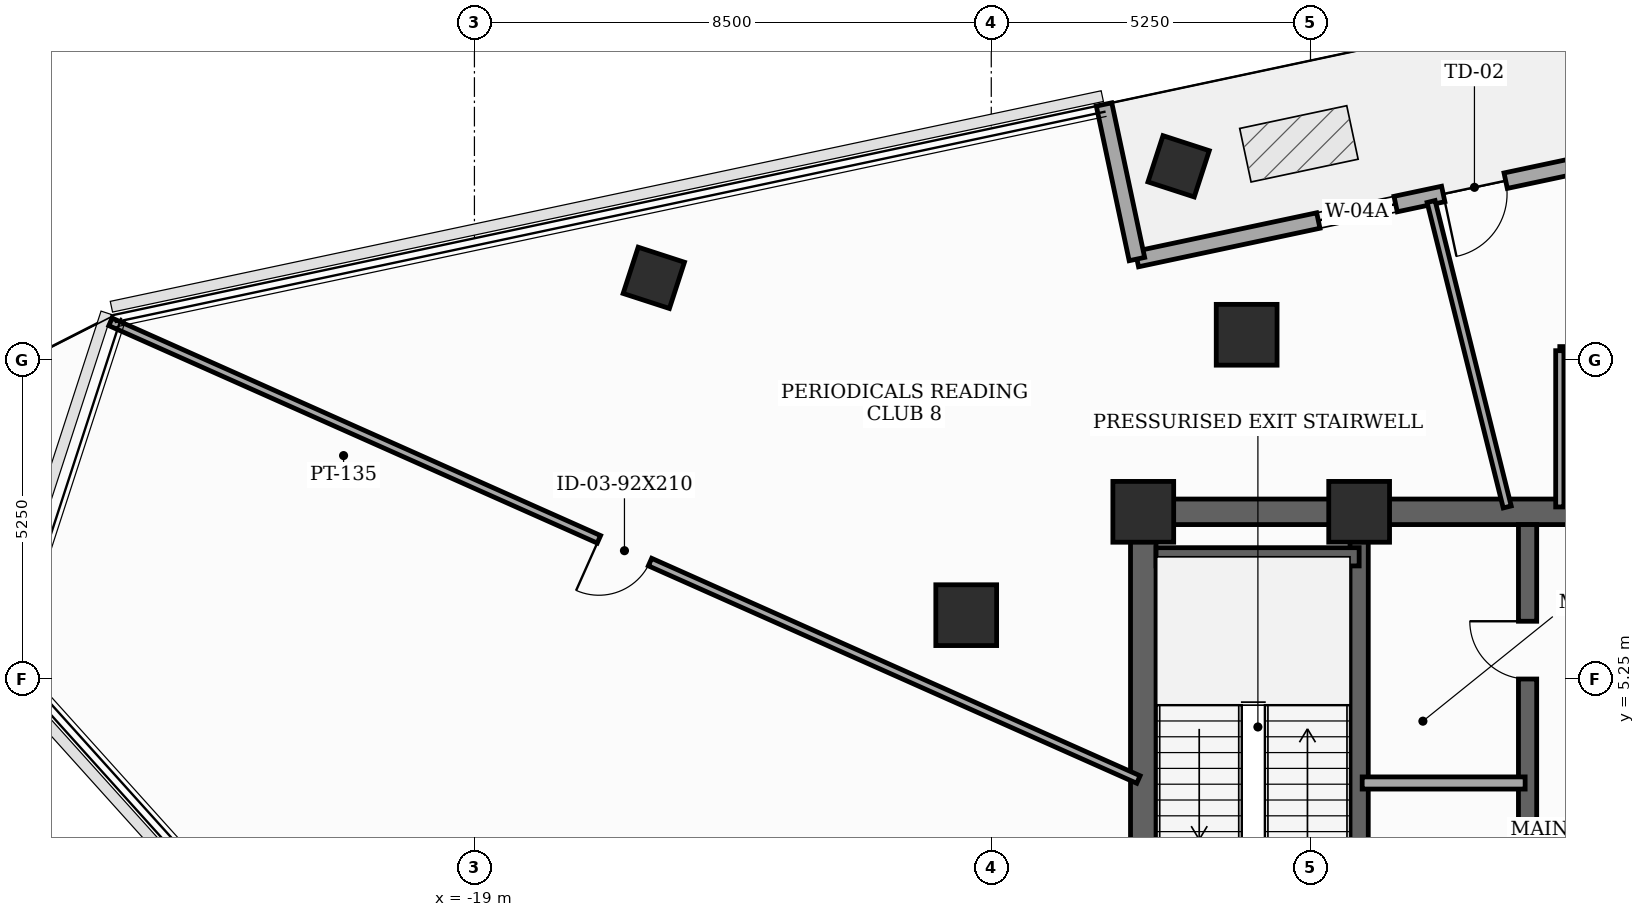
"""IFC4 building model, lengths in metres.
Left out: names, types, materials, properties, quantities, classifications, styles, units other than length and angle.
Written with IfcOpenShell. Run it as: python <this file> out.ifc"""

import sys

from ifc_helpers import new_model, si_unit, direction, frame, frame_2d, origin, origin_2d, place, context, subcontext, project, spatial, rectangle, extrude, element, fill, save


model = new_model("IFC4")
c1 = context("Model", 3, precision=1e-05, world=origin(), true_north=direction((0.0, 1.0)))
c2 = subcontext(c1, "Body", "Model", "MODEL_VIEW")
j1 = project(units=[si_unit("LENGTHUNIT", "METRE"), si_unit("PLANEANGLEUNIT", "RADIAN")], contexts=[c1])
p1 = place(None, origin())
s1 = spatial("IfcSite", under=j1, at=p1, CompositionType="ELEMENT")
p2 = place(p1, origin())
s2 = spatial("IfcBuilding", under=s1, at=p2, CompositionType="ELEMENT")
p3 = place(p2, frame((0.0, 0.0, 290.6)))
s3 = spatial("IfcBuildingStorey", under=s2, at=p3, CompositionType="ELEMENT", Elevation=290.6)
for number, where, z_axis, x_axis in (
    (1, (-4.45, 8.0, 0.0), (0.0, 0.0, 1.0), (1.0, 0.0, 0.0)),
    (2, (-8.0, 8.0, 0.0), (0.0, 0.0, 1.0), (1.0, 0.0, 0.0)),
    (3, (-6.3, 10.912, 0.0), (0.0, 0.0, 1.0), (1.0, 0.0, 0.0)),
    (4, (-10.912, 6.3, 0.0), (0.0, 0.0, 1.0), (1.0, 0.0, 0.0)),
):
    element("IfcColumn", number, at=place(p3, frame(where, z_axis=z_axis, x_axis=x_axis)), inside=s3, PredefinedType="COLUMN", context=c2, shape_type="SweptSolid", body=[
        extrude(rectangle(XDim=1.0, YDim=1.0, at=origin_2d()), origin(), (0.0, 0.0, 1.0), 3.7),
    ])
for number, where, z_axis, x_axis in (
    (5, (-7.419, 13.683, 0.0), (0.0, 0.0, 1.0), (0.309, 0.951, 0.0)),
    (6, (-16.05, 11.848, 0.0), (0.0, 0.0, 1.0), (0.309, 0.951, 0.0)),
):
    element("IfcColumn", number, at=place(p3, frame(where, z_axis=z_axis, x_axis=x_axis)), inside=s3, PredefinedType="COLUMN", context=c2, shape_type="SweptSolid", body=[
        extrude(rectangle(XDim=0.8, YDim=0.8, at=origin_2d()), origin(), (0.0, 0.0, 1.0), 3.7),
    ])
p4 = place(p3, frame((2.459, 14.402, 0.0), z_axis=(0.0, 0.0, 1.0), x_axis=(-0.978149082982, -0.207904717268, 0.0)))
e7 = element("IfcWall", 7, at=p4, inside=s3, PredefinedType="SOLIDWALL", context=c2, shape_type="SweptSolid", body=[
    extrude(rectangle(XDim=10.8, YDim=0.26, at=frame_2d((5.4, 0.0))), origin(), (0.0, 0.0, 1.0), 3.5),
])
p5 = place(p4, frame((4.6, 0.0, 0.0)))
e8 = element("IfcOpeningElement", 8, at=p5, cuts=e7, PredefinedType="OPENING", context=c2, shape_type="SweptSolid", body=[
    extrude(rectangle(XDim=1.05, YDim=2.08, at=frame_2d((0.525, 1.04))), frame((0.0, 0.14, 0.0), z_axis=(0.0, -1.0, 0.0), x_axis=(1.0, 0.0, 0.0)), (0.0, 0.0, 1.0), 0.28),
])
p6 = place(p4, frame((6.45, 0.0, 0.85)))
e9 = element("IfcOpeningElement", 9, at=p6, cuts=e7, PredefinedType="OPENING", context=c2, shape_type="SweptSolid", body=[
    extrude(rectangle(XDim=1.3, YDim=1.25, at=frame_2d((0.65, 0.625))), frame((0.0, 0.14, 0.0), z_axis=(0.0, -1.0, 0.0), x_axis=(1.0, 0.0, 0.0)), (0.0, 0.0, 1.0), 0.28),
])
p7 = place(p3, frame((-8.105, 12.157, 0.0), z_axis=(0.0, 0.0, 1.0), x_axis=(-0.207893569688, 0.978151452323, 0.0)))
e10 = element("IfcWall", 10, at=p7, inside=s3, PredefinedType="SOLIDWALL", context=c2, shape_type="SweptSolid", body=[
    extrude(rectangle(XDim=2.6, YDim=0.26, at=frame_2d((1.3, 0.0))), origin(), (0.0, 0.0, 1.0), 3.5),
])
p8 = place(p3, frame((-8.0, -8.0, 0.0), z_axis=(0.0, 0.0, 1.0), x_axis=(0.0, 1.0, 0.0)))
e11 = element("IfcWall", 11, at=p8, inside=s3, PredefinedType="SHEAR", context=c2, shape_type="SweptSolid", body=[
    extrude(rectangle(XDim=16.0, YDim=0.42, at=frame_2d((8.0, 0.0))), origin(), (0.0, 0.0, 1.0), 3.5),
])
p9 = place(p8, frame((0.681, 0.0, 0.0)))
e12 = element("IfcOpeningElement", 12, at=p9, cuts=e11, PredefinedType="OPENING", context=c2, shape_type="SweptSolid", body=[
    extrude(rectangle(XDim=0.85, YDim=2.02, at=frame_2d((0.425, 1.01))), frame((0.0, 0.22, 0.0), z_axis=(0.0, -1.0, 0.0), x_axis=(1.0, 0.0, 0.0)), (0.0, 0.0, 1.0), 0.44),
])
p10 = place(p8, frame((5.35, 0.0, 0.0)))
e13 = element("IfcOpeningElement", 13, at=p10, cuts=e11, PredefinedType="OPENING", context=c2, shape_type="SweptSolid", body=[
    extrude(rectangle(XDim=1.05, YDim=2.15, at=frame_2d((0.525, 1.075))), frame((0.0, 0.22, 0.0), z_axis=(0.0, -1.0, 0.0), x_axis=(1.0, 0.0, 0.0)), (0.0, 0.0, 1.0), 0.44),
])
p11 = place(p3, frame((-8.0, 8.0, 0.0), z_axis=(0.0, 0.0, 1.0), x_axis=(1.0, 0.0, 0.0)))
e14 = element("IfcWall", 14, at=p11, inside=s3, PredefinedType="SHEAR", context=c2, shape_type="SweptSolid", body=[
    extrude(rectangle(XDim=16.0, YDim=0.42, at=frame_2d((8.0, 0.0))), origin(), (0.0, 0.0, 1.0), 3.5),
])
p12 = place(p11, frame((7.1, 0.0, 0.0)))
e15 = element("IfcOpeningElement", 15, at=p12, cuts=e14, PredefinedType="OPENING", context=c2, shape_type="SweptSolid", body=[
    extrude(rectangle(XDim=1.8, YDim=2.15, at=frame_2d((0.9, 1.075))), frame((0.0, 0.22, 0.0), z_axis=(0.0, -1.0, 0.0), x_axis=(1.0, 0.0, 0.0)), (0.0, 0.0, 1.0), 0.44),
])
p13 = place(p3, frame((-4.45, -7.79, 0.0), z_axis=(0.0, 0.0, 1.0), x_axis=(0.0, 1.0, 0.0)))
e16 = element("IfcWall", 16, at=p13, inside=s3, PredefinedType="SHEAR", context=c2, shape_type="SweptSolid", body=[
    extrude(rectangle(XDim=15.58, YDim=0.3, at=frame_2d((7.79, 0.0))), origin(), (0.0, 0.0, 1.0), 3.5),
])
p14 = place(p3, frame((-7.79, 7.26, 0.0), z_axis=(0.0, 0.0, 1.0), x_axis=(1.0, 0.0, 0.0)))
e17 = element("IfcWall", 17, at=p14, inside=s3, PredefinedType="SHEAR", context=c2, shape_type="SweptSolid", body=[
    extrude(rectangle(XDim=3.34, YDim=0.3, at=frame_2d((1.67, 0.0))), origin(), (0.0, 0.0, 1.0), 3.5),
])
p15 = place(p3, frame((-1.68, -4.85, 0.0), z_axis=(0.0, 0.0, 1.0), x_axis=(0.0, 1.0, 0.0)))
e18 = element("IfcWall", 18, at=p15, inside=s3, PredefinedType="SHEAR", context=c2, shape_type="SweptSolid", body=[
    extrude(rectangle(XDim=12.64, YDim=0.3, at=frame_2d((6.32, 0.0))), origin(), (0.0, 0.0, 1.0), 3.5),
])
p16 = place(p15, frame((1.65, 0.0, 0.0)))
e19 = element("IfcOpeningElement", 19, at=p16, cuts=e18, PredefinedType="OPENING", context=c2, shape_type="SweptSolid", body=[
    extrude(rectangle(XDim=0.95, YDim=2.1, at=frame_2d((0.475, 1.05))), frame((0.0, 0.16, 0.0), z_axis=(0.0, -1.0, 0.0), x_axis=(1.0, 0.0, 0.0)), (0.0, 0.0, 1.0), 0.32),
])
p17 = place(p15, frame((5.9, 0.0, 0.0)))
e20 = element("IfcOpeningElement", 20, at=p17, cuts=e18, PredefinedType="OPENING", context=c2, shape_type="SweptSolid", body=[
    extrude(rectangle(XDim=0.95, YDim=2.1, at=frame_2d((0.475, 1.05))), frame((0.0, 0.16, 0.0), z_axis=(0.0, -1.0, 0.0), x_axis=(1.0, 0.0, 0.0)), (0.0, 0.0, 1.0), 0.32),
])
p18 = place(p15, frame((10.1, 0.0, 0.0)))
e21 = element("IfcOpeningElement", 21, at=p18, cuts=e18, PredefinedType="OPENING", context=c2, shape_type="SweptSolid", body=[
    extrude(rectangle(XDim=0.95, YDim=2.1, at=frame_2d((0.475, 1.05))), frame((0.0, 0.16, 0.0), z_axis=(0.0, -1.0, 0.0), x_axis=(1.0, 0.0, 0.0)), (0.0, 0.0, 1.0), 0.32),
])
p19 = place(p3, frame((-4.4, 3.54, 0.0), z_axis=(0.0, 0.0, 1.0), x_axis=(1.0, 0.0, 0.0)))
e22 = element("IfcWall", 22, at=p19, inside=s3, PredefinedType="SOLIDWALL", context=c2, shape_type="SweptSolid", body=[
    extrude(rectangle(XDim=2.68, YDim=0.2, at=frame_2d((1.34, 0.0))), origin(), (0.0, 0.0, 1.0), 3.5),
])
p20 = place(p3, frame((10.15, 10.65, 0.0), z_axis=(0.0, 0.0, 1.0), x_axis=(-1.0, 0.0, 0.0)))
e23 = element("IfcWall", 23, at=p20, inside=s3, PredefinedType="PARTITIONING", context=c2, shape_type="SweptSolid", body=[
    extrude(rectangle(XDim=11.3, YDim=0.135, at=frame_2d((5.65, 0.0))), origin(), (0.0, 0.0, 1.0), 2.885),
])
p21 = place(p20, frame((6.531, 0.0, 0.0)))
e24 = element("IfcOpeningElement", 24, at=p21, cuts=e23, PredefinedType="OPENING", context=c2, shape_type="SweptSolid", body=[
    extrude(rectangle(XDim=0.95, YDim=2.1, at=frame_2d((0.475, 1.05))), frame((0.0, 0.077, 0.0), z_axis=(0.0, -1.0, 0.0), x_axis=(1.0, 0.0, 0.0)), (0.0, 0.0, 1.0), 0.155),
])
p22 = place(p3, frame((-1.15, 10.65, 0.0), z_axis=(0.0, 0.0, 1.0), x_axis=(0.0, -1.0, 0.0)))
e25 = element("IfcWall", 25, at=p22, inside=s3, PredefinedType="PARTITIONING", context=c2, shape_type="SweptSolid", body=[
    extrude(rectangle(XDim=2.57, YDim=0.135, at=frame_2d((1.285, 0.0))), origin(), (0.0, 0.0, 1.0), 2.885),
])
p23 = place(p3, frame((-8.08, 3.597, 0.0), z_axis=(0.0, 0.0, 1.0), x_axis=(-0.913542590258, 0.406743083266, 0.0)))
e26 = element("IfcWall", 26, at=p23, inside=s3, PredefinedType="PARTITIONING", context=c2, shape_type="SweptSolid", body=[
    extrude(rectangle(XDim=18.505, YDim=0.135, at=frame_2d((9.252, 0.0))), origin(), (0.0, 0.0, 1.0), 2.885),
])
p24 = place(p23, frame((8.792, 0.0, 0.0)))
e27 = element("IfcOpeningElement", 27, at=p24, cuts=e26, PredefinedType="OPENING", context=c2, shape_type="SweptSolid", body=[
    extrude(rectangle(XDim=0.92, YDim=2.1, at=frame_2d((0.46, 1.05))), frame((0.0, 0.077, 0.0), z_axis=(0.0, -1.0, 0.0), x_axis=(1.0, 0.0, 0.0)), (0.0, 0.0, 1.0), 0.155),
])
p25 = place(p3, frame((-3.267, 13.104, 0.0), z_axis=(0.0, 0.0, 1.0), x_axis=(0.241825418424, -0.970319775643, 0.0)))
e28 = element("IfcWall", 28, at=p25, inside=s3, PredefinedType="PARTITIONING", context=c2, shape_type="SweptSolid", body=[
    extrude(rectangle(XDim=5.177, YDim=0.135, at=frame_2d((2.588, 0.0))), origin(), (0.0, 0.0, 1.0), 2.885),
])
p26 = place(p5, frame((1.05, 0.0, 0.0), z_axis=(0.0, 0.0, 1.0), x_axis=(-1.0, 0.0, 0.0)))
e29 = element("IfcDoor", 29, at=p26, inside=s3, OperationType="SINGLE_SWING_LEFT", PredefinedType="DOOR", context=c2, shape_type="SweptSolid", body=[
    extrude(rectangle(XDim=1.05, YDim=2.08, at=frame_2d((0.525, 1.04))), frame((0.0, 0.025, 0.0), z_axis=(0.0, -1.0, 0.0), x_axis=(1.0, 0.0, 0.0)), (0.0, 0.0, 1.0), 0.05),
])
fill(e8, e29)
p27 = place(p6, origin())
e30 = element("IfcWindow", 30, at=p27, inside=s3, PartitioningType="SINGLE_PANEL", PredefinedType="WINDOW", context=c2, shape_type="SweptSolid", body=[
    extrude(rectangle(XDim=1.3, YDim=1.25, at=frame_2d((0.65, 0.625))), frame((0.0, 0.03, 0.0), z_axis=(0.0, -1.0, 0.0), x_axis=(1.0, 0.0, 0.0)), (0.0, 0.0, 1.0), 0.06),
])
fill(e9, e30)
p28 = place(p18, origin())
e31 = element("IfcDoor", 31, at=p28, inside=s3, OperationType="SINGLE_SWING_RIGHT", PredefinedType="DOOR", context=c2, shape_type="SweptSolid", body=[
    extrude(rectangle(XDim=0.95, YDim=2.1, at=frame_2d((0.475, 1.05))), frame((0.0, 0.025, 0.0), z_axis=(0.0, -1.0, 0.0), x_axis=(1.0, 0.0, 0.0)), (0.0, 0.0, 1.0), 0.05),
])
fill(e21, e31)
p29 = place(p24, origin())
e32 = element("IfcDoor", 32, at=p29, inside=s3, OperationType="SINGLE_SWING_RIGHT", PredefinedType="DOOR", context=c2, shape_type="SweptSolid", body=[
    extrude(rectangle(XDim=0.92, YDim=2.1, at=frame_2d((0.46, 1.05))), frame((0.0, 0.025, 0.0), z_axis=(0.0, -1.0, 0.0), x_axis=(1.0, 0.0, 0.0)), (0.0, 0.0, 1.0), 0.05),
])
fill(e27, e32)
save(model, sys.argv[1])
